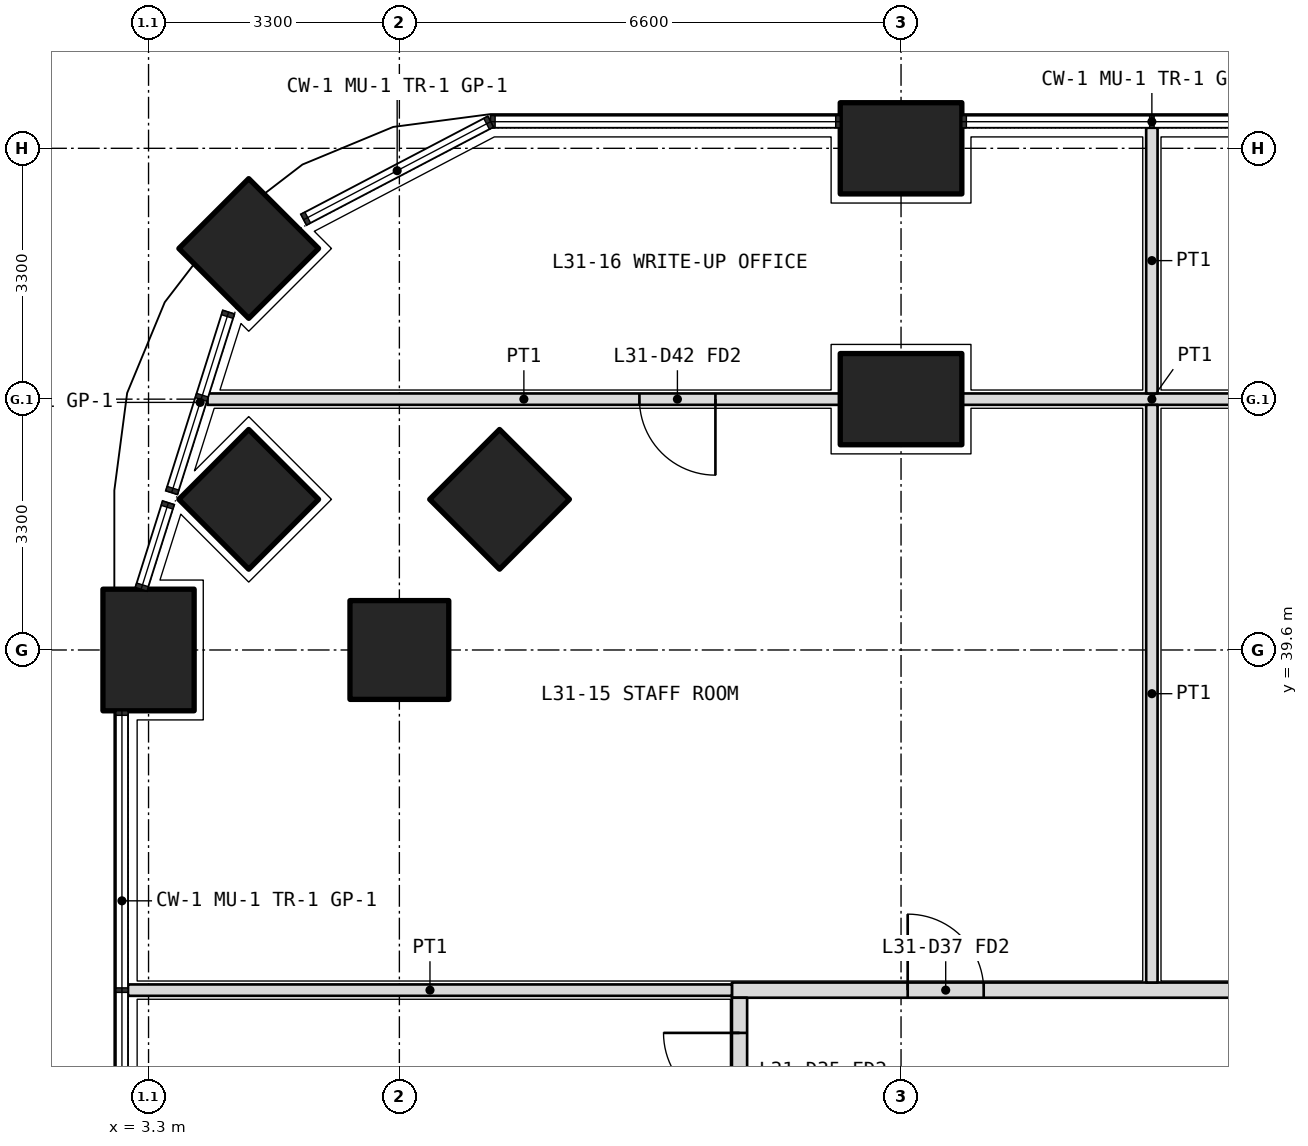
"""IFC4 building model, lengths in metres.
Left out: names, types, materials, properties, quantities, classifications, styles, units other than length and angle.
Written with IfcOpenShell. Run it as: python <this file> out.ifc"""

import sys

from ifc_helpers import new_model, si_unit, direction, frame, frame_2d, origin, origin_2d, place, context, subcontext, project, spatial, rectangle, extrude, element, fill, save


model = new_model("IFC4")
c1 = context("Model", 3, precision=1e-05, world=origin(), true_north=direction((0.0, 1.0)))
c2 = subcontext(c1, "Body", "Model", "MODEL_VIEW")
j1 = project(units=[si_unit("LENGTHUNIT", "METRE"), si_unit("PLANEANGLEUNIT", "RADIAN")], contexts=[c1])
p1 = place(None, origin())
s1 = spatial("IfcSite", under=j1, at=p1, CompositionType="ELEMENT")
p2 = place(p1, origin())
s2 = spatial("IfcBuilding", under=s1, at=p2, CompositionType="ELEMENT")
p3 = place(p2, frame((0.0, 0.0, 136.8)))
s3 = spatial("IfcBuildingStorey", under=s2, at=p3, CompositionType="ELEMENT", Elevation=136.8)
p4 = place(p3, frame((4.618, 44.882, 0.0), z_axis=(0.0, 0.0, 1.0), x_axis=(0.707106781187, 0.707106781187, 0.0)))
e1 = element("IfcColumn", 1, at=p4, inside=s3, PredefinedType="COLUMN", context=c2, shape_type="SweptSolid", body=[
    extrude(rectangle(XDim=1.3, YDim=1.3, at=origin_2d()), origin(), (0.0, 0.0, 1.0), 4.2),
])
for number, where, z_axis, x_axis in (
    (2, (3.3, 39.6, 0.0), (0.0, 0.0, 1.0), (0.0, 1.0, 0.0)),
    (3, (13.2, 46.2, 0.0), (0.0, 0.0, 1.0), (1.0, 0.0, 0.0)),
):
    element("IfcColumn", number, at=place(p3, frame(where, z_axis=z_axis, x_axis=x_axis)), inside=s3, PredefinedType="COLUMN", context=c2, shape_type="SweptSolid", body=[
        extrude(rectangle(XDim=1.6, YDim=1.2, at=origin_2d()), origin(), (0.0, 0.0, 1.0), 4.2),
    ])
for number, where, z_axis, x_axis in (
    (4, (6.6, 39.6, 0.0), (0.0, 0.0, 1.0), (1.0, 0.0, 0.0)),
    (5, (4.618, 41.582, 0.0), (0.0, 0.0, 1.0), (0.707, 0.707, 0.0)),
):
    element("IfcColumn", number, at=place(p3, frame(where, z_axis=z_axis, x_axis=x_axis)), inside=s3, PredefinedType="COLUMN", context=c2, shape_type="SweptSolid", body=[
        extrude(rectangle(XDim=1.3, YDim=1.3, at=origin_2d()), origin(), (0.0, 0.0, 1.0), 4.2),
    ])
p5 = place(p3, frame((13.2, 42.9, 0.0), z_axis=(0.0, 0.0, 1.0), x_axis=(1.0, 0.0, 0.0)))
e6 = element("IfcColumn", 6, at=p5, inside=s3, PredefinedType="COLUMN", context=c2, shape_type="SweptSolid", body=[
    extrude(rectangle(XDim=1.6, YDim=1.2, at=origin_2d()), origin(), (0.0, 0.0, 1.0), 4.2),
])
p6 = place(p3, frame((7.918, 41.582, 0.0), z_axis=(0.0, 0.0, 1.0), x_axis=(0.707106781187, 0.707106781187, 0.0)))
e7 = element("IfcColumn", 7, at=p6, inside=s3, PredefinedType="COLUMN", context=c2, shape_type="SweptSolid", body=[
    extrude(rectangle(XDim=1.3, YDim=1.3, at=origin_2d()), origin(), (0.0, 0.0, 1.0), 4.2),
])
p7 = place(p3, frame((10.975, 35.125, 0.0), z_axis=(0.0, 0.0, 1.0), x_axis=(1.0, 0.0, 0.0)))
e8 = element("IfcWall", 8, at=p7, inside=s3, PredefinedType="PARTITIONING", context=c2, shape_type="SweptSolid", body=[
    extrude(rectangle(XDim=30.85, YDim=0.2, at=frame_2d((15.425, 0.0))), origin(), (0.0, 0.0, 1.0), 2.85),
])
p8 = place(p7, frame((2.312, 0.0, 0.0)))
e9 = element("IfcOpeningElement", 9, at=p8, cuts=e8, PredefinedType="OPENING", context=c2, shape_type="SweptSolid", body=[
    extrude(rectangle(XDim=1.0, YDim=2.1, at=frame_2d((0.5, 1.05))), frame((0.0, 0.11, 0.0), z_axis=(0.0, -1.0, 0.0), x_axis=(1.0, 0.0, 0.0)), (0.0, 0.0, 1.0), 0.22),
])
p9 = place(p7, frame((8.325, 0.0, 0.0)))
e10 = element("IfcOpeningElement", 10, at=p9, cuts=e8, PredefinedType="OPENING", context=c2, shape_type="SweptSolid", body=[
    extrude(rectangle(XDim=1.0, YDim=2.1, at=frame_2d((0.5, 1.05))), frame((0.0, 0.11, 0.0), z_axis=(0.0, -1.0, 0.0), x_axis=(1.0, 0.0, 0.0)), (0.0, 0.0, 1.0), 0.22),
])
p10 = place(p7, frame((13.375, 0.0, 0.0)))
e11 = element("IfcOpeningElement", 11, at=p10, cuts=e8, PredefinedType="OPENING", context=c2, shape_type="SweptSolid", body=[
    extrude(rectangle(XDim=1.0, YDim=2.1, at=frame_2d((0.5, 1.05))), frame((0.0, 0.11, 0.0), z_axis=(0.0, -1.0, 0.0), x_axis=(1.0, 0.0, 0.0)), (0.0, 0.0, 1.0), 0.22),
])
p11 = place(p7, frame((16.675, 0.0, 0.0)))
e12 = element("IfcOpeningElement", 12, at=p11, cuts=e8, PredefinedType="OPENING", context=c2, shape_type="SweptSolid", body=[
    extrude(rectangle(XDim=1.0, YDim=2.1, at=frame_2d((0.5, 1.05))), frame((0.0, 0.11, 0.0), z_axis=(0.0, -1.0, 0.0), x_axis=(1.0, 0.0, 0.0)), (0.0, 0.0, 1.0), 0.22),
])
p12 = place(p7, frame((24.238, 0.0, 0.0)))
e13 = element("IfcOpeningElement", 13, at=p12, cuts=e8, PredefinedType="OPENING", context=c2, shape_type="SweptSolid", body=[
    extrude(rectangle(XDim=1.0, YDim=2.1, at=frame_2d((0.5, 1.05))), frame((0.0, 0.11, 0.0), z_axis=(0.0, -1.0, 0.0), x_axis=(1.0, 0.0, 0.0)), (0.0, 0.0, 1.0), 0.22),
])
p13 = place(p3, frame((11.075, 7.4, 0.0), z_axis=(0.0, 0.0, 1.0), x_axis=(0.0, 1.0, 0.0)))
e14 = element("IfcWall", 14, at=p13, inside=s3, PredefinedType="PARTITIONING", context=c2, shape_type="SweptSolid", body=[
    extrude(rectangle(XDim=27.625, YDim=0.2, at=frame_2d((13.812, 0.0))), origin(), (0.0, 0.0, 1.0), 2.85),
])
p14 = place(p13, frame((2.35, 0.0, 0.0)))
e15 = element("IfcOpeningElement", 15, at=p14, cuts=e14, PredefinedType="OPENING", context=c2, shape_type="SweptSolid", body=[
    extrude(rectangle(XDim=1.0, YDim=2.1, at=frame_2d((0.5, 1.05))), frame((0.0, 0.11, 0.0), z_axis=(0.0, -1.0, 0.0), x_axis=(1.0, 0.0, 0.0)), (0.0, 0.0, 1.0), 0.22),
])
p15 = place(p13, frame((6.35, 0.0, 0.0)))
e16 = element("IfcOpeningElement", 16, at=p15, cuts=e14, PredefinedType="OPENING", context=c2, shape_type="SweptSolid", body=[
    extrude(rectangle(XDim=1.0, YDim=2.1, at=frame_2d((0.5, 1.05))), frame((0.0, 0.11, 0.0), z_axis=(0.0, -1.0, 0.0), x_axis=(1.0, 0.0, 0.0)), (0.0, 0.0, 1.0), 0.22),
])
p16 = place(p13, frame((9.425, 0.0, 0.0)))
e17 = element("IfcOpeningElement", 17, at=p16, cuts=e14, PredefinedType="OPENING", context=c2, shape_type="SweptSolid", body=[
    extrude(rectangle(XDim=0.9, YDim=2.1, at=frame_2d((0.45, 1.05))), frame((0.0, 0.11, 0.0), z_axis=(0.0, -1.0, 0.0), x_axis=(1.0, 0.0, 0.0)), (0.0, 0.0, 1.0), 0.22),
])
p17 = place(p13, frame((13.275, 0.0, 0.0)))
e18 = element("IfcOpeningElement", 18, at=p17, cuts=e14, PredefinedType="OPENING", context=c2, shape_type="SweptSolid", body=[
    extrude(rectangle(XDim=0.9, YDim=2.1, at=frame_2d((0.45, 1.05))), frame((0.0, 0.11, 0.0), z_axis=(0.0, -1.0, 0.0), x_axis=(1.0, 0.0, 0.0)), (0.0, 0.0, 1.0), 0.22),
])
p18 = place(p13, frame((16.8, 0.0, 0.0)))
e19 = element("IfcOpeningElement", 19, at=p18, cuts=e14, PredefinedType="OPENING", context=c2, shape_type="SweptSolid", body=[
    extrude(rectangle(XDim=1.0, YDim=2.1, at=frame_2d((0.5, 1.05))), frame((0.0, 0.11, 0.0), z_axis=(0.0, -1.0, 0.0), x_axis=(1.0, 0.0, 0.0)), (0.0, 0.0, 1.0), 0.22),
])
p19 = place(p13, frame((21.8, 0.0, 0.0)))
e20 = element("IfcOpeningElement", 20, at=p19, cuts=e14, PredefinedType="OPENING", context=c2, shape_type="SweptSolid", body=[
    extrude(rectangle(XDim=1.0, YDim=2.1, at=frame_2d((0.5, 1.05))), frame((0.0, 0.11, 0.0), z_axis=(0.0, -1.0, 0.0), x_axis=(1.0, 0.0, 0.0)), (0.0, 0.0, 1.0), 0.22),
])
p20 = place(p13, frame((26.163, 0.0, 0.0)))
e21 = element("IfcOpeningElement", 21, at=p20, cuts=e14, PredefinedType="OPENING", context=c2, shape_type="SweptSolid", body=[
    extrude(rectangle(XDim=1.0, YDim=2.1, at=frame_2d((0.5, 1.05))), frame((0.0, 0.11, 0.0), z_axis=(0.0, -1.0, 0.0), x_axis=(1.0, 0.0, 0.0)), (0.0, 0.0, 1.0), 0.22),
])
p21 = place(p3, frame((3.03, 35.125, 0.0), z_axis=(0.0, 0.0, 1.0), x_axis=(1.0, 0.0, 0.0)))
e22 = element("IfcWall", 22, at=p21, inside=s3, PredefinedType="PARTITIONING", context=c2, shape_type="SweptSolid", body=[
    extrude(rectangle(XDim=7.945, YDim=0.15, at=frame_2d((3.973, 0.0))), origin(), (0.0, 0.0, 1.0), 2.6),
])
p22 = place(p3, frame((19.0, 42.9, 0.0), z_axis=(0.0, 0.0, 1.0), x_axis=(-1.0, 0.0, 0.0)))
e23 = element("IfcWall", 23, at=p22, inside=s3, PredefinedType="PARTITIONING", context=c2, shape_type="SweptSolid", body=[
    extrude(rectangle(XDim=5.0, YDim=0.15, at=frame_2d((2.5, 0.0))), origin(), (0.0, 0.0, 1.0), 2.85),
])
p23 = place(p3, frame((12.4, 42.9, 0.0), z_axis=(0.0, 0.0, 1.0), x_axis=(-1.0, 0.0, 0.0)))
e24 = element("IfcWall", 24, at=p23, inside=s3, PredefinedType="PARTITIONING", context=c2, shape_type="SweptSolid", body=[
    extrude(rectangle(XDim=8.324, YDim=0.15, at=frame_2d((4.162, 0.0))), origin(), (0.0, 0.0, 1.0), 2.6),
])
p24 = place(p23, frame((1.642, 0.0, 0.0)))
e25 = element("IfcOpeningElement", 25, at=p24, cuts=e24, PredefinedType="OPENING", context=c2, shape_type="SweptSolid", body=[
    extrude(rectangle(XDim=1.0, YDim=2.1, at=frame_2d((0.5, 1.05))), frame((0.0, 0.085, 0.0), z_axis=(0.0, -1.0, 0.0), x_axis=(1.0, 0.0, 0.0)), (0.0, 0.0, 1.0), 0.17),
])
p25 = place(p3, frame((16.5, 46.47, 0.0), z_axis=(0.0, 0.0, 1.0), x_axis=(0.0, -1.0, 0.0)))
e26 = element("IfcWall", 26, at=p25, inside=s3, PredefinedType="PARTITIONING", context=c2, shape_type="SweptSolid", body=[
    extrude(rectangle(XDim=3.495, YDim=0.15, at=frame_2d((1.748, 0.0))), origin(), (0.0, 0.0, 1.0), 2.6),
])
p26 = place(p3, frame((16.5, 42.825, 0.0), z_axis=(0.0, 0.0, 1.0), x_axis=(0.0, -1.0, 0.0)))
e27 = element("IfcWall", 27, at=p26, inside=s3, PredefinedType="PARTITIONING", context=c2, shape_type="SweptSolid", body=[
    extrude(rectangle(XDim=7.6, YDim=0.15, at=frame_2d((3.8, 0.0))), origin(), (0.0, 0.0, 1.0), 3.9),
])
p27 = place(p8, origin())
e28 = element("IfcDoor", 28, at=p27, inside=s3, OperationType="SINGLE_SWING_LEFT", PredefinedType="DOOR", context=c2, shape_type="SweptSolid", body=[
    extrude(rectangle(XDim=1.0, YDim=2.1, at=frame_2d((0.5, 1.05))), frame((0.0, 0.025, 0.0), z_axis=(0.0, -1.0, 0.0), x_axis=(1.0, 0.0, 0.0)), (0.0, 0.0, 1.0), 0.05),
])
fill(e9, e28)
p28 = place(p24, origin())
e29 = element("IfcDoor", 29, at=p28, inside=s3, OperationType="SINGLE_SWING_LEFT", PredefinedType="DOOR", context=c2, shape_type="SweptSolid", body=[
    extrude(rectangle(XDim=1.0, YDim=2.1, at=frame_2d((0.5, 1.05))), frame((0.0, 0.025, 0.0), z_axis=(0.0, -1.0, 0.0), x_axis=(1.0, 0.0, 0.0)), (0.0, 0.0, 1.0), 0.05),
])
fill(e25, e29)
p29 = place(p20, origin())
e30 = element("IfcDoor", 30, at=p29, inside=s3, OperationType="SINGLE_SWING_RIGHT", PredefinedType="DOOR", context=c2, shape_type="SweptSolid", body=[
    extrude(rectangle(XDim=1.0, YDim=2.1, at=frame_2d((0.5, 1.05))), frame((0.0, 0.025, 0.0), z_axis=(0.0, -1.0, 0.0), x_axis=(1.0, 0.0, 0.0)), (0.0, 0.0, 1.0), 0.05),
])
fill(e21, e30)
save(model, sys.argv[1])
